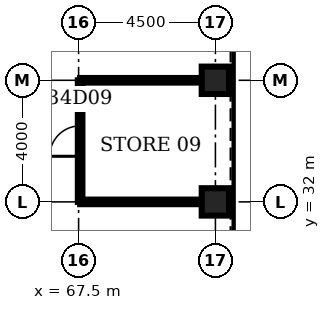
"""IFC4 building model, lengths in metres.
Left out: names, types, materials, properties, quantities, classifications, styles, units other than length and angle.
Written with IfcOpenShell. Run it as: python <this file> out.ifc"""

import sys

from ifc_helpers import new_model, si_unit, direction, frame, frame_2d, origin, origin_2d, place, context, subcontext, project, spatial, rectangle, hollow_rectangle, extrude, element, fill, save


model = new_model("IFC4")
c1 = context("Model", 3, precision=1e-05, world=origin(), true_north=direction((0.0, 1.0)))
c2 = subcontext(c1, "Body", "Model", "MODEL_VIEW")
j1 = project(units=[si_unit("LENGTHUNIT", "METRE"), si_unit("PLANEANGLEUNIT", "RADIAN")], contexts=[c1])
p1 = place(None, origin())
s1 = spatial("IfcSite", under=j1, at=p1, CompositionType="ELEMENT")
p2 = place(p1, origin())
s2 = spatial("IfcBuilding", under=s1, at=p2, CompositionType="ELEMENT")
p3 = place(p2, frame((0.0, 0.0, 155.1)))
s3 = spatial("IfcBuildingStorey", under=s2, at=p3, CompositionType="ELEMENT", Elevation=155.1)
for number, where, z_axis, x_axis in (
    (1, (72.0, 32.0, 0.0), (0.0, 0.0, 1.0), (1.0, 0.0, 0.0)),
    (2, (72.0, 36.0, 0.0), (0.0, 0.0, 1.0), (1.0, 0.0, 0.0)),
):
    element("IfcColumn", number, at=place(p3, frame(where, z_axis=z_axis, x_axis=x_axis)), inside=s3, PredefinedType="COLUMN", context=c2, shape_type="SweptSolid", body=[
        extrude(hollow_rectangle(XDim=0.9, YDim=0.9, WallThickness=0.1, at=origin_2d()), origin(), (0.0, 0.0, 1.0), 4.2),
    ])
for number, where, z_axis, x_axis in (
    (3, (67.55, 32.0, 0.0), (0.0, 0.0, 1.0), (1.0, 0.0, 0.0)),
    (4, (67.55, 36.0, 0.0), (0.0, 0.0, 1.0), (1.0, 0.0, 0.0)),
):
    element("IfcWall", number, at=place(p3, frame(where, z_axis=z_axis, x_axis=x_axis)), inside=s3, PredefinedType="PARTITIONING", context=c2, shape_type="SweptSolid", body=[
        extrude(rectangle(XDim=4.0, YDim=0.15, at=frame_2d((2.0, 0.0))), origin(), (0.0, 0.0, 1.0), 3.0),
    ])
p4 = place(p3, frame((67.55, 32.0, 0.0), z_axis=(0.0, 0.0, 1.0), x_axis=(0.0, 1.0, 0.0)))
e5 = element("IfcWall", 5, at=p4, inside=s3, PredefinedType="PARTITIONING", context=c2, shape_type="SweptSolid", body=[
    extrude(rectangle(XDim=4.0, YDim=0.15, at=frame_2d((2.0, 0.0))), origin(), (0.0, 0.0, 1.0), 3.0),
])
p5 = place(p4, frame((1.5, 0.0, 0.0)))
e6 = element("IfcOpeningElement", 6, at=p5, cuts=e5, PredefinedType="OPENING", context=c2, shape_type="SweptSolid", body=[
    extrude(rectangle(XDim=1.0, YDim=2.1, at=frame_2d((0.5, 1.05))), frame((0.0, 0.085, 0.0), z_axis=(0.0, -1.0, 0.0), x_axis=(1.0, 0.0, 0.0)), (0.0, 0.0, 1.0), 0.17),
])
p6 = place(p5, origin())
e7 = element("IfcDoor", 7, at=p6, inside=s3, OperationType="SINGLE_SWING_LEFT", PredefinedType="DOOR", context=c2, shape_type="SweptSolid", body=[
    extrude(rectangle(XDim=1.0, YDim=2.1, at=frame_2d((0.5, 1.05))), frame((0.0, 0.025, 0.0), z_axis=(0.0, -1.0, 0.0), x_axis=(1.0, 0.0, 0.0)), (0.0, 0.0, 1.0), 0.05),
])
fill(e6, e7)
save(model, sys.argv[1])
